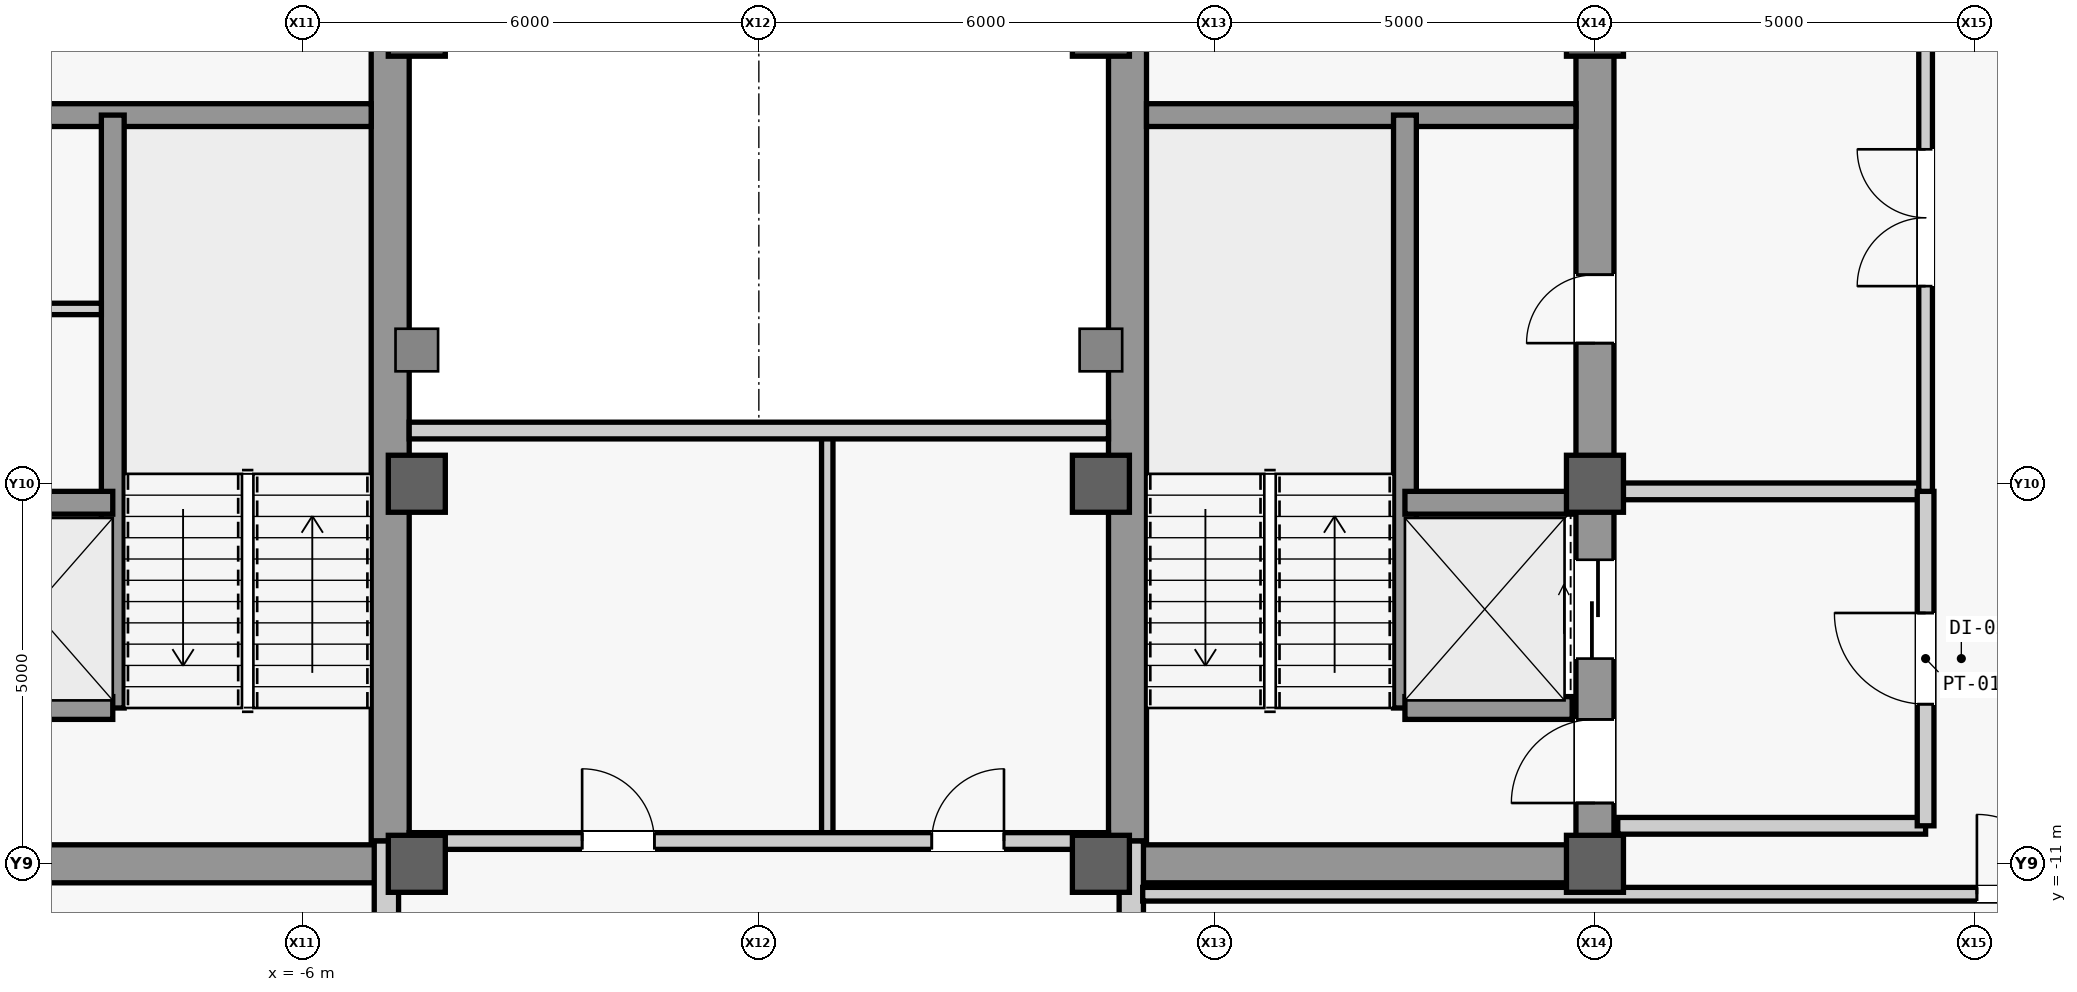
"""IFC4 building model, lengths in metres.
Left out: names, types, materials, properties, quantities, classifications, styles, units other than length and angle.
Written with IfcOpenShell. Run it as: python <this file> out.ifc"""

import sys

from ifc_helpers import new_model, si_unit, direction, frame, frame_2d, origin, origin_2d, place, context, subcontext, project, spatial, rectangle, extrude, source, transform, mapped, element, fill, save


model = new_model("IFC4")
c1 = context("Model", 3, precision=1e-05, world=origin(), true_north=direction((0.0, 1.0)))
c2 = subcontext(c1, "Body", "Model", "MODEL_VIEW")
j1 = project(units=[si_unit("LENGTHUNIT", "METRE"), si_unit("PLANEANGLEUNIT", "RADIAN")], contexts=[c1])
p1 = place(None, origin())
s1 = spatial("IfcSite", under=j1, at=p1, CompositionType="ELEMENT")
p2 = place(p1, origin())
s2 = spatial("IfcBuilding", under=s1, at=p2, CompositionType="ELEMENT")
p3 = place(p2, frame((0.0, 0.0, 350.3)))
s3 = spatial("IfcBuildingStorey", under=s2, at=p3, CompositionType="ELEMENT", Elevation=350.3)
m1 = source(origin(), c2, "Body", "SweptSolid", [
    extrude(rectangle(XDim=22.0, YDim=0.5, at=frame_2d((11.0, 0.0))), origin(), (0.0, 0.0, 1.0), 3.74),
])
p4 = place(p3, frame((11.0, -11.0, 0.0), z_axis=(0.0, 0.0, 1.0), x_axis=(0.0, 1.0, 0.0)))
e1 = element("IfcWall", 1, at=p4, inside=s3, PredefinedType="SHEAR", context=c2, shape_type="MappedRepresentation", body=[
    mapped(m1, transform((0.0, 0.0, 0.0), scale=1.0)),
])
m2 = source(origin(), c2, "Body", "SweptSolid", [
    extrude(rectangle(XDim=1.1, YDim=2.2, at=frame_2d((0.55, 1.1))), frame((0.0, 0.26, 0.0), z_axis=(0.0, -1.0, 0.0), x_axis=(1.0, 0.0, 0.0)), (0.0, 0.0, 1.0), 0.52),
])
p5 = place(p4, frame((0.8, 0.0, 0.0)))
e2 = element("IfcOpeningElement", 2, at=p5, cuts=e1, PredefinedType="OPENING", context=c2, shape_type="MappedRepresentation", body=[
    mapped(m2, transform((0.0, 0.0, 0.0), scale=1.0)),
])
m3 = source(origin(), c2, "Body", "SweptSolid", [
    extrude(rectangle(XDim=0.9, YDim=2.15, at=frame_2d((0.45, 1.075))), frame((0.0, 0.26, 0.0), z_axis=(0.0, -1.0, 0.0), x_axis=(1.0, 0.0, 0.0)), (0.0, 0.0, 1.0), 0.52),
])
p6 = place(p4, frame((6.85, 0.0, 0.0)))
e3 = element("IfcOpeningElement", 3, at=p6, cuts=e1, PredefinedType="OPENING", context=c2, shape_type="MappedRepresentation", body=[
    mapped(m3, transform((0.0, 0.0, 0.0), scale=1.0)),
])
m4 = source(origin(), c2, "Body", "SweptSolid", [
    extrude(rectangle(XDim=1.2, YDim=2.3, at=frame_2d((0.6, 1.15))), frame((0.0, 0.26, 0.0), z_axis=(0.0, -1.0, 0.0), x_axis=(1.0, 0.0, 0.0)), (0.0, 0.0, 1.0), 0.52),
])
p7 = place(p4, frame((17.6, 0.0, 0.0)))
e4 = element("IfcOpeningElement", 4, at=p7, cuts=e1, PredefinedType="OPENING", context=c2, shape_type="MappedRepresentation", body=[
    mapped(m4, transform((0.0, 0.0, 0.0), scale=1.0)),
])
p8 = place(p4, frame((19.6, 0.0, 0.0)))
e5 = element("IfcOpeningElement", 5, at=p8, cuts=e1, PredefinedType="OPENING", context=c2, shape_type="MappedRepresentation", body=[
    mapped(m4, transform((0.0, 0.0, 0.0), scale=1.0)),
])
m5 = source(origin(), c2, "Body", "SweptSolid", [
    extrude(rectangle(XDim=1.3, YDim=2.3, at=frame_2d((0.65, 1.15))), frame((0.0, 0.26, 0.0), z_axis=(0.0, -1.0, 0.0), x_axis=(1.0, 0.0, 0.0)), (0.0, 0.0, 1.0), 0.52),
])
p9 = place(p4, frame((2.7, 0.0, 0.0)))
e6 = element("IfcOpeningElement", 6, at=p9, cuts=e1, PredefinedType="OPENING", context=c2, shape_type="MappedRepresentation", body=[
    mapped(m5, transform((0.0, 0.0, 0.0), scale=1.0)),
])
p10 = place(p4, frame((13.35, 0.0, 0.0)))
e7 = element("IfcOpeningElement", 7, at=p10, cuts=e1, PredefinedType="OPENING", context=c2, shape_type="MappedRepresentation", body=[
    mapped(m5, transform((0.0, 0.0, 0.0), scale=1.0)),
])
m6 = source(origin(), c2, "Body", "SweptSolid", [
    extrude(rectangle(XDim=21.4, YDim=0.5, at=frame_2d((10.7, 0.0))), origin(), (0.0, 0.0, 1.0), 3.74),
])
for number, where, z_axis, x_axis in (
    (8, (-4.85, -10.7, 0.0), (0.0, 0.0, 1.0), (0.0, 1.0, 0.0)),
    (9, (4.85, -10.7, 0.0), (0.0, 0.0, 1.0), (0.0, 1.0, 0.0)),
):
    element("IfcWall", number, at=place(p3, frame(where, z_axis=z_axis, x_axis=x_axis)), inside=s3, PredefinedType="SHEAR", context=c2, shape_type="MappedRepresentation", body=[
        mapped(m6, transform((0.0, 0.0, 0.0), scale=1.0)),
    ])
m7 = source(origin(), c2, "Body", "SweptSolid", [
    extrude(rectangle(XDim=5.9, YDim=0.5, at=frame_2d((2.95, 0.0))), origin(), (0.0, 0.0, 1.0), 3.74),
])
for number, where, z_axis, x_axis in (
    (10, (-10.75, -11.0, 0.0), (0.0, 0.0, 1.0), (1.0, 0.0, 0.0)),
    (11, (4.85, -11.0, 0.0), (0.0, 0.0, 1.0), (1.0, 0.0, 0.0)),
):
    element("IfcWall", number, at=place(p3, frame(where, z_axis=z_axis, x_axis=x_axis)), inside=s3, PredefinedType="SHEAR", context=c2, shape_type="MappedRepresentation", body=[
        mapped(m7, transform((0.0, 0.0, 0.0), scale=1.0)),
    ])
m8 = source(origin(), c2, "Body", "SweptSolid", [
    extrude(rectangle(XDim=5.65, YDim=0.3, at=frame_2d((2.825, 0.0))), origin(), (0.0, 0.0, 1.0), 3.74),
])
for number, where, z_axis, x_axis in (
    (12, (-10.75, -1.15, 0.0), (0.0, 0.0, 1.0), (1.0, 0.0, 0.0)),
    (13, (5.1, -1.15, 0.0), (0.0, 0.0, 1.0), (1.0, 0.0, 0.0)),
):
    element("IfcWall", number, at=place(p3, frame(where, z_axis=z_axis, x_axis=x_axis)), inside=s3, PredefinedType="SHEAR", context=c2, shape_type="MappedRepresentation", body=[
        mapped(m8, transform((0.0, 0.0, 0.0), scale=1.0)),
    ])
m9 = source(origin(), c2, "Body", "SweptSolid", [
    extrude(rectangle(XDim=0.75, YDim=0.75, at=origin_2d()), origin(), (0.0, 0.0, 1.0), 4.0),
])
for number, where, z_axis, x_axis in (
    (14, (-4.5, -11.0, 0.0), (0.0, 0.0, 1.0), (1.0, 0.0, 0.0)),
    (15, (-4.5, -6.0, 0.0), (0.0, 0.0, 1.0), (1.0, 0.0, 0.0)),
    (16, (-4.5, 0.0, 0.0), (0.0, 0.0, 1.0), (1.0, 0.0, 0.0)),
    (17, (4.5, -11.0, 0.0), (0.0, 0.0, 1.0), (1.0, 0.0, 0.0)),
    (18, (4.5, -6.0, 0.0), (0.0, 0.0, 1.0), (1.0, 0.0, 0.0)),
    (19, (4.5, 0.0, 0.0), (0.0, 0.0, 1.0), (1.0, 0.0, 0.0)),
    (20, (11.0, -11.0, 0.0), (0.0, 0.0, 1.0), (1.0, 0.0, 0.0)),
    (21, (11.0, -6.0, 0.0), (0.0, 0.0, 1.0), (1.0, 0.0, 0.0)),
    (22, (11.0, 0.0, 0.0), (0.0, 0.0, 1.0), (1.0, 0.0, 0.0)),
):
    element("IfcColumn", number, at=place(p3, frame(where, z_axis=z_axis, x_axis=x_axis)), inside=s3, PredefinedType="COLUMN", context=c2, shape_type="MappedRepresentation", body=[
        mapped(m9, transform((0.0, 0.0, 0.0), scale=1.0)),
    ])
m10 = source(origin(), c2, "Body", "SweptSolid", [
    extrude(rectangle(XDim=14.98, YDim=0.32, at=frame_2d((7.49, 0.0))), origin(), (0.0, 0.0, 1.0), 3.045),
])
for number, where, z_axis, x_axis in (
    (23, (-4.9, -25.68, 0.0), (0.0, 0.0, 1.0), (0.0, 1.0, 0.0)),
    (24, (4.9, -25.68, 0.0), (0.0, 0.0, 1.0), (0.0, 1.0, 0.0)),
):
    element("IfcWall", number, at=place(p3, frame(where, z_axis=z_axis, x_axis=x_axis)), inside=s3, PredefinedType="STANDARD", context=c2, shape_type="MappedRepresentation", body=[
        mapped(m10, transform((0.0, 0.0, 0.0), scale=1.0)),
    ])
m11 = source(origin(), c2, "Body", "SweptSolid", [
    extrude(rectangle(XDim=7.8, YDim=0.3, at=frame_2d((3.9, 0.0))), origin(), (0.0, 0.0, 1.0), 3.74),
])
p11 = place(p3, frame((-8.5, -8.95, 0.0), z_axis=(0.0, 0.0, 1.0), x_axis=(0.0, 1.0, 0.0)))
e25 = element("IfcWall", 25, at=p11, inside=s3, PredefinedType="SHEAR", context=c2, shape_type="MappedRepresentation", body=[
    mapped(m11, transform((0.0, 0.0, 0.0), scale=1.0)),
])
m12 = source(origin(), c2, "Body", "SweptSolid", [
    extrude(rectangle(XDim=2.2, YDim=0.3, at=frame_2d((1.1, 0.0))), origin(), (0.0, 0.0, 1.0), 3.74),
])
for number, where, z_axis, x_axis in (
    (26, (-10.7, -8.95, 0.0), (0.0, 0.0, 1.0), (1.0, 0.0, 0.0)),
    (27, (-10.7, -6.25, 0.0), (0.0, 0.0, 1.0), (1.0, 0.0, 0.0)),
):
    element("IfcWall", number, at=place(p3, frame(where, z_axis=z_axis, x_axis=x_axis)), inside=s3, PredefinedType="SHEAR", context=c2, shape_type="MappedRepresentation", body=[
        mapped(m12, transform((0.0, 0.0, 0.0), scale=1.0)),
    ])
p12 = place(p3, frame((8.5, -8.95, 0.0), z_axis=(0.0, 0.0, 1.0), x_axis=(0.0, 1.0, 0.0)))
e28 = element("IfcWall", 28, at=p12, inside=s3, PredefinedType="SHEAR", context=c2, shape_type="MappedRepresentation", body=[
    mapped(m11, transform((0.0, 0.0, 0.0), scale=1.0)),
])
for number, where, z_axis, x_axis in (
    (29, (8.5, -8.95, 0.0), (0.0, 0.0, 1.0), (1.0, 0.0, 0.0)),
    (30, (8.5, -6.25, 0.0), (0.0, 0.0, 1.0), (1.0, 0.0, 0.0)),
):
    element("IfcWall", number, at=place(p3, frame(where, z_axis=z_axis, x_axis=x_axis)), inside=s3, PredefinedType="SHEAR", context=c2, shape_type="MappedRepresentation", body=[
        mapped(m12, transform((0.0, 0.0, 0.0), scale=1.0)),
    ])
m13 = source(origin(), c2, "Body", "SweptSolid", [
    extrude(rectangle(XDim=2.05, YDim=0.15, at=frame_2d((1.025, 0.0))), origin(), (0.0, 0.0, 1.0), 3.74),
])
p13 = place(p3, frame((-10.7, -3.7, 0.0), z_axis=(0.0, 0.0, 1.0), x_axis=(1.0, 0.0, 0.0)))
e31 = element("IfcWall", 31, at=p13, inside=s3, PredefinedType="PARTITIONING", context=c2, shape_type="MappedRepresentation", body=[
    mapped(m13, transform((0.0, 0.0, 0.0), scale=1.0)),
])
m14 = source(origin(), c2, "Body", "SweptSolid", [
    extrude(rectangle(XDim=4.05, YDim=0.22, at=frame_2d((2.025, 0.0))), origin(), (0.0, 0.0, 1.0), 3.74),
])
p14 = place(p3, frame((11.3, -10.5, 0.0), z_axis=(0.0, 0.0, 1.0), x_axis=(1.0, 0.0, 0.0)))
e32 = element("IfcWall", 32, at=p14, inside=s3, PredefinedType="PARTITIONING", context=c2, shape_type="MappedRepresentation", body=[
    mapped(m14, transform((0.0, 0.0, 0.0), scale=1.0)),
])
m15 = source(origin(), c2, "Body", "SweptSolid", [
    extrude(rectangle(XDim=4.05, YDim=0.22, at=frame_2d((2.025, 0.0))), origin(), (0.0, 0.0, 1.0), 3.124),
])
p15 = place(p3, frame((11.3, -6.1, 0.0), z_axis=(0.0, 0.0, 1.0), x_axis=(1.0, 0.0, 0.0)))
e33 = element("IfcWall", 33, at=p15, inside=s3, PredefinedType="PARTITIONING", context=c2, shape_type="MappedRepresentation", body=[
    mapped(m15, transform((0.0, 0.0, 0.0), scale=1.0)),
])
m16 = source(origin(), c2, "Body", "SweptSolid", [
    extrude(rectangle(XDim=4.4, YDim=0.22, at=frame_2d((2.2, 0.0))), origin(), (0.0, 0.0, 1.0), 3.74),
])
p16 = place(p3, frame((15.35, -10.5, 0.0), z_axis=(0.0, 0.0, 1.0), x_axis=(0.0, 1.0, 0.0)))
e34 = element("IfcWall", 34, at=p16, inside=s3, PredefinedType="PARTITIONING", context=c2, shape_type="MappedRepresentation", body=[
    mapped(m16, transform((0.0, 0.0, 0.0), scale=1.0)),
])
m17 = source(origin(), c2, "Body", "SweptSolid", [
    extrude(rectangle(XDim=1.2, YDim=2.2, at=frame_2d((0.6, 1.1))), frame((0.0, 0.12, 0.0), z_axis=(0.0, -1.0, 0.0), x_axis=(1.0, 0.0, 0.0)), (0.0, 0.0, 1.0), 0.24),
])
p17 = place(p16, frame((1.6, 0.0, 0.0)))
e35 = element("IfcOpeningElement", 35, at=p17, cuts=e34, PredefinedType="OPENING", context=c2, shape_type="MappedRepresentation", body=[
    mapped(m17, transform((0.0, 0.0, 0.0), scale=1.0)),
])
m18 = source(origin(), c2, "Body", "SweptSolid", [
    extrude(rectangle(XDim=16.6, YDim=0.18, at=frame_2d((8.3, 0.0))), origin(), (0.0, 0.0, 1.0), 3.74),
])
p18 = place(p3, frame((15.35, -6.1, 0.0), z_axis=(0.0, 0.0, 1.0), x_axis=(0.0, 1.0, 0.0)))
e36 = element("IfcWall", 36, at=p18, inside=s3, PredefinedType="PARTITIONING", context=c2, shape_type="MappedRepresentation", body=[
    mapped(m18, transform((0.0, 0.0, 0.0), scale=1.0)),
])
m19 = source(origin(), c2, "Body", "SweptSolid", [
    extrude(rectangle(XDim=1.8, YDim=2.25, at=frame_2d((0.9, 1.125))), frame((0.0, 0.1, 0.0), z_axis=(0.0, -1.0, 0.0), x_axis=(1.0, 0.0, 0.0)), (0.0, 0.0, 1.0), 0.2),
])
p19 = place(p18, frame((2.7, 0.0, 0.0)))
e37 = element("IfcOpeningElement", 37, at=p19, cuts=e36, PredefinedType="OPENING", context=c2, shape_type="MappedRepresentation", body=[
    mapped(m19, transform((0.0, 0.0, 0.0), scale=1.0)),
])
p20 = place(p18, frame((13.0, 0.0, 0.0)))
e38 = element("IfcOpeningElement", 38, at=p20, cuts=e36, PredefinedType="OPENING", context=c2, shape_type="MappedRepresentation", body=[
    mapped(m19, transform((0.0, 0.0, 0.0), scale=1.0)),
])
m20 = source(origin(), c2, "Body", "SweptSolid", [
    extrude(rectangle(XDim=5.4, YDim=0.15, at=frame_2d((2.7, 0.0))), origin(), (0.0, 0.0, 1.0), 3.74),
])
p21 = place(p3, frame((0.9, -10.7, 0.0), z_axis=(0.0, 0.0, 1.0), x_axis=(0.0, 1.0, 0.0)))
e39 = element("IfcWall", 39, at=p21, inside=s3, PredefinedType="PARTITIONING", context=c2, shape_type="MappedRepresentation", body=[
    mapped(m20, transform((0.0, 0.0, 0.0), scale=1.0)),
])
m21 = source(origin(), c2, "Body", "SweptSolid", [
    extrude(rectangle(XDim=9.2, YDim=0.22, at=frame_2d((4.6, 0.0))), origin(), (0.0, 0.0, 1.0), 3.74),
])
p22 = place(p3, frame((-4.6, -10.7, 0.0), z_axis=(0.0, 0.0, 1.0), x_axis=(1.0, 0.0, 0.0)))
e40 = element("IfcWall", 40, at=p22, inside=s3, PredefinedType="PARTITIONING", context=c2, shape_type="MappedRepresentation", body=[
    mapped(m21, transform((0.0, 0.0, 0.0), scale=1.0)),
])
m22 = source(origin(), c2, "Body", "SweptSolid", [
    extrude(rectangle(XDim=0.95, YDim=2.15, at=frame_2d((0.475, 1.075))), frame((0.0, 0.12, 0.0), z_axis=(0.0, -1.0, 0.0), x_axis=(1.0, 0.0, 0.0)), (0.0, 0.0, 1.0), 0.24),
])
p23 = place(p22, frame((2.275, 0.0, 0.0)))
e41 = element("IfcOpeningElement", 41, at=p23, cuts=e40, PredefinedType="OPENING", context=c2, shape_type="MappedRepresentation", body=[
    mapped(m22, transform((0.0, 0.0, 0.0), scale=1.0)),
])
p24 = place(p22, frame((6.875, 0.0, 0.0)))
e42 = element("IfcOpeningElement", 42, at=p24, cuts=e40, PredefinedType="OPENING", context=c2, shape_type="MappedRepresentation", body=[
    mapped(m22, transform((0.0, 0.0, 0.0), scale=1.0)),
])
p25 = place(p3, frame((-4.6, -5.3, 0.0), z_axis=(0.0, 0.0, 1.0), x_axis=(1.0, 0.0, 0.0)))
e43 = element("IfcWall", 43, at=p25, inside=s3, PredefinedType="PARTITIONING", context=c2, shape_type="MappedRepresentation", body=[
    mapped(m21, transform((0.0, 0.0, 0.0), scale=1.0)),
])
m23 = source(origin(), c2, "Body", "SweptSolid", [
    extrude(rectangle(XDim=12.7, YDim=0.18, at=frame_2d((6.35, 0.0))), origin(), (0.0, 0.0, 1.0), 2.79),
])
p26 = place(p3, frame((5.05, -11.4, 0.0), z_axis=(0.0, 0.0, 1.0), x_axis=(1.0, 0.0, 0.0)))
e44 = element("IfcWall", 44, at=p26, inside=s3, PredefinedType="PARTITIONING", context=c2, shape_type="MappedRepresentation", body=[
    mapped(m23, transform((0.0, 0.0, 0.0), scale=1.0)),
])
m24 = source(origin(), c2, "Body", "SweptSolid", [
    extrude(rectangle(XDim=1.05, YDim=2.2, at=frame_2d((0.525, 1.1))), frame((0.0, 0.1, 0.0), z_axis=(0.0, -1.0, 0.0), x_axis=(1.0, 0.0, 0.0)), (0.0, 0.0, 1.0), 0.2),
])
p27 = place(p26, frame((10.975, 0.0, 0.0)))
e45 = element("IfcOpeningElement", 45, at=p27, cuts=e44, PredefinedType="OPENING", context=c2, shape_type="MappedRepresentation", body=[
    mapped(m24, transform((0.0, 0.0, 0.0), scale=1.0)),
])
m25 = source(origin(), c2, "Body", "SweptSolid", [
    extrude(rectangle(XDim=1.1, YDim=2.2, at=frame_2d((0.55, 1.1))), frame((0.0, 0.025, 0.0), z_axis=(0.0, -1.0, 0.0), x_axis=(1.0, 0.0, 0.0)), (0.0, 0.0, 1.0), 0.05),
])
p28 = place(p5, origin())
e46 = element("IfcDoor", 46, at=p28, inside=s3, OperationType="SINGLE_SWING_LEFT", PredefinedType="DOOR", context=c2, shape_type="MappedRepresentation", body=[
    mapped(m25, transform((0.0, 0.0, 0.0), scale=1.0)),
])
fill(e2, e46)
m26 = source(origin(), c2, "Body", "SweptSolid", [
    extrude(rectangle(XDim=0.9, YDim=2.15, at=frame_2d((0.45, 1.075))), frame((0.0, 0.025, 0.0), z_axis=(0.0, -1.0, 0.0), x_axis=(1.0, 0.0, 0.0)), (0.0, 0.0, 1.0), 0.05),
])
p29 = place(p6, origin())
e47 = element("IfcDoor", 47, at=p29, inside=s3, OperationType="SINGLE_SWING_LEFT", PredefinedType="DOOR", context=c2, shape_type="MappedRepresentation", body=[
    mapped(m26, transform((0.0, 0.0, 0.0), scale=1.0)),
])
fill(e3, e47)
m27 = source(origin(), c2, "Body", "SweptSolid", [
    extrude(rectangle(XDim=1.2, YDim=2.2, at=frame_2d((0.6, 1.1))), frame((0.0, 0.025, 0.0), z_axis=(0.0, -1.0, 0.0), x_axis=(1.0, 0.0, 0.0)), (0.0, 0.0, 1.0), 0.05),
])
p30 = place(p17, origin())
e48 = element("IfcDoor", 48, at=p30, inside=s3, OperationType="SINGLE_SWING_RIGHT", PredefinedType="DOOR", context=c2, shape_type="MappedRepresentation", body=[
    mapped(m27, transform((0.0, 0.0, 0.0), scale=1.0)),
])
fill(e35, e48)
m28 = source(origin(), c2, "Body", "SweptSolid", [
    extrude(rectangle(XDim=1.8, YDim=2.25, at=frame_2d((0.9, 1.125))), frame((0.0, 0.025, 0.0), z_axis=(0.0, -1.0, 0.0), x_axis=(1.0, 0.0, 0.0)), (0.0, 0.0, 1.0), 0.05),
])
p31 = place(p19, origin())
e49 = element("IfcDoor", 49, at=p31, inside=s3, OperationType="SINGLE_SWING_RIGHT", PredefinedType="DOOR", context=c2, shape_type="MappedRepresentation", body=[
    mapped(m28, transform((0.0, 0.0, 0.0), scale=1.0)),
])
fill(e37, e49)
m29 = source(origin(), c2, "Body", "SweptSolid", [
    extrude(rectangle(XDim=0.95, YDim=2.15, at=frame_2d((0.475, 1.075))), frame((0.0, 0.025, 0.0), z_axis=(0.0, -1.0, 0.0), x_axis=(1.0, 0.0, 0.0)), (0.0, 0.0, 1.0), 0.05),
])
p32 = place(p23, origin())
e50 = element("IfcDoor", 50, at=p32, inside=s3, OperationType="SINGLE_SWING_LEFT", PredefinedType="DOOR", context=c2, shape_type="MappedRepresentation", body=[
    mapped(m29, transform((0.0, 0.0, 0.0), scale=1.0)),
])
fill(e41, e50)
p33 = place(p24, origin())
e51 = element("IfcDoor", 51, at=p33, inside=s3, OperationType="SINGLE_SWING_RIGHT", PredefinedType="DOOR", context=c2, shape_type="MappedRepresentation", body=[
    mapped(m29, transform((0.0, 0.0, 0.0), scale=1.0)),
])
fill(e42, e51)
m30 = source(origin(), c2, "Body", "SweptSolid", [
    extrude(rectangle(XDim=1.05, YDim=2.2, at=frame_2d((0.525, 1.1))), frame((0.0, 0.025, 0.0), z_axis=(0.0, -1.0, 0.0), x_axis=(1.0, 0.0, 0.0)), (0.0, 0.0, 1.0), 0.05),
])
p34 = place(p27, origin())
e52 = element("IfcDoor", 52, at=p34, inside=s3, OperationType="SINGLE_SWING_LEFT", PredefinedType="DOOR", context=c2, shape_type="MappedRepresentation", body=[
    mapped(m30, transform((0.0, 0.0, 0.0), scale=1.0)),
])
fill(e45, e52)
m31 = source(origin(), c2, "Body", "SweptSolid", [
    extrude(rectangle(XDim=1.3, YDim=2.3, at=frame_2d((0.65, 1.15))), frame((0.0, 0.025, 0.0), z_axis=(0.0, -1.0, 0.0), x_axis=(1.0, 0.0, 0.0)), (0.0, 0.0, 1.0), 0.05),
])
p35 = place(p9, origin())
e53 = element("IfcDoor", 53, at=p35, inside=s3, OperationType="SLIDING_TO_LEFT", PredefinedType="DOOR", context=c2, shape_type="MappedRepresentation", body=[
    mapped(m31, transform((0.0, 0.0, 0.0), scale=1.0)),
])
fill(e6, e53)
save(model, sys.argv[1])
